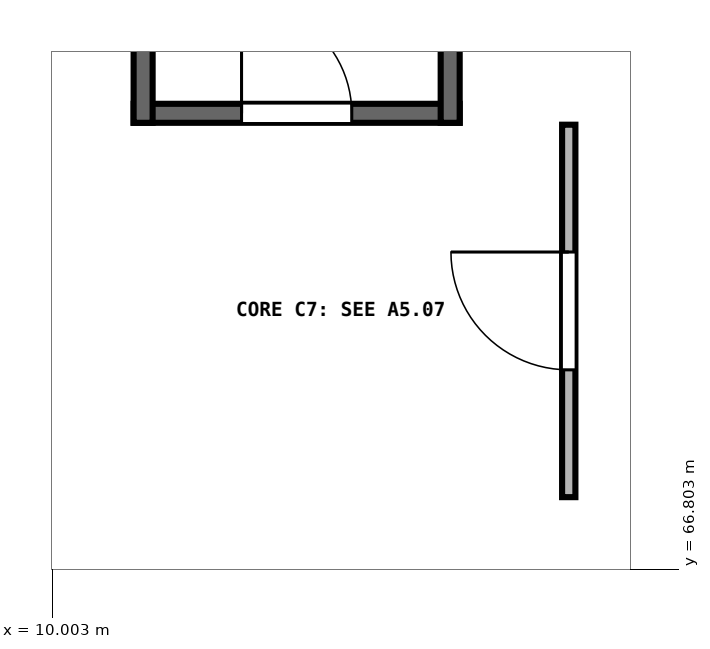
"""IFC4 building model, lengths in metres.
Left out: names, types, materials, properties, quantities, classifications, styles, units other than length and angle.
Written with IfcOpenShell. Run it as: python <this file> out.ifc"""

import sys

from ifc_helpers import new_model, si_unit, direction, frame, frame_2d, origin, place, context, subcontext, project, spatial, rectangle, extrude, element, fill, save


model = new_model("IFC4")
c1 = context("Model", 3, precision=1e-05, world=origin(), true_north=direction((0.0, 1.0)))
c2 = subcontext(c1, "Body", "Model", "MODEL_VIEW")
j1 = project(units=[si_unit("LENGTHUNIT", "METRE"), si_unit("PLANEANGLEUNIT", "RADIAN")], contexts=[c1])
p1 = place(None, origin())
s1 = spatial("IfcSite", under=j1, at=p1, CompositionType="ELEMENT")
p2 = place(p1, origin())
s2 = spatial("IfcBuilding", under=s1, at=p2, CompositionType="ELEMENT")
p3 = place(p2, frame((0.0, 0.0, 5.4)))
s3 = spatial("IfcBuildingStorey", under=s2, at=p3, CompositionType="ELEMENT", Elevation=5.4)
p4 = place(p3, frame((11.075, 72.8, 0.0), z_axis=(0.0, 0.0, 1.0), x_axis=(1.0, 0.0, 0.0)))
e1 = element("IfcWall", 1, at=p4, inside=s3, PredefinedType="SHEAR", context=c2, shape_type="SweptSolid", body=[
    extrude(rectangle(XDim=4.29, YDim=0.25, at=frame_2d((2.145, 0.0))), origin(), (0.0, 0.0, 1.0), 4.54),
])
p5 = place(p4, frame((1.42, 0.0, 0.0)))
e2 = element("IfcOpeningElement", 2, at=p5, cuts=e1, PredefinedType="OPENING", context=c2, shape_type="SweptSolid", body=[
    extrude(rectangle(XDim=1.45, YDim=2.2, at=frame_2d((0.725, 1.1))), frame((0.0, 0.135, 0.0), z_axis=(0.0, -1.0, 0.0), x_axis=(1.0, 0.0, 0.0)), (0.0, 0.0, 1.0), 0.27),
])
for number, where, z_axis, x_axis in (
    (3, (11.2, 72.675, 0.0), (0.0, 0.0, 1.0), (0.0, 1.0, 0.0)),
    (4, (15.24, 72.675, 0.0), (0.0, 0.0, 1.0), (0.0, 1.0, 0.0)),
):
    element("IfcWall", number, at=place(p3, frame(where, z_axis=z_axis, x_axis=x_axis)), inside=s3, PredefinedType="SHEAR", context=c2, shape_type="SweptSolid", body=[
        extrude(rectangle(XDim=11.09, YDim=0.25, at=frame_2d((5.545, 0.0))), origin(), (0.0, 0.0, 1.0), 4.54),
    ])
p6 = place(p3, frame((16.8, 67.75, 0.0), z_axis=(0.0, 0.0, 1.0), x_axis=(0.0, 1.0, 0.0)))
e5 = element("IfcWall", 5, at=p6, inside=s3, PredefinedType="PARTITIONING", context=c2, shape_type="SweptSolid", body=[
    extrude(rectangle(XDim=4.9, YDim=0.175, at=frame_2d((2.45, 0.0))), origin(), (0.0, 0.0, 1.0), 4.49),
])
p7 = place(p6, frame((1.675, 0.0, 0.0)))
e6 = element("IfcOpeningElement", 6, at=p7, cuts=e5, PredefinedType="OPENING", context=c2, shape_type="SweptSolid", body=[
    extrude(rectangle(XDim=1.55, YDim=2.22, at=frame_2d((0.775, 1.11))), frame((0.0, 0.097, 0.0), z_axis=(0.0, -1.0, 0.0), x_axis=(1.0, 0.0, 0.0)), (0.0, 0.0, 1.0), 0.195),
])
p8 = place(p5, origin())
e7 = element("IfcDoor", 7, at=p8, inside=s3, OperationType="SINGLE_SWING_LEFT", PredefinedType="DOOR", context=c2, shape_type="SweptSolid", body=[
    extrude(rectangle(XDim=1.45, YDim=2.2, at=frame_2d((0.725, 1.1))), frame((0.0, 0.025, 0.0), z_axis=(0.0, -1.0, 0.0), x_axis=(1.0, 0.0, 0.0)), (0.0, 0.0, 1.0), 0.05),
])
fill(e2, e7)
p9 = place(p7, origin())
e8 = element("IfcDoor", 8, at=p9, inside=s3, OperationType="SINGLE_SWING_RIGHT", PredefinedType="DOOR", context=c2, shape_type="SweptSolid", body=[
    extrude(rectangle(XDim=1.55, YDim=2.22, at=frame_2d((0.775, 1.11))), frame((0.0, 0.025, 0.0), z_axis=(0.0, -1.0, 0.0), x_axis=(1.0, 0.0, 0.0)), (0.0, 0.0, 1.0), 0.05),
])
fill(e6, e8)
save(model, sys.argv[1])
